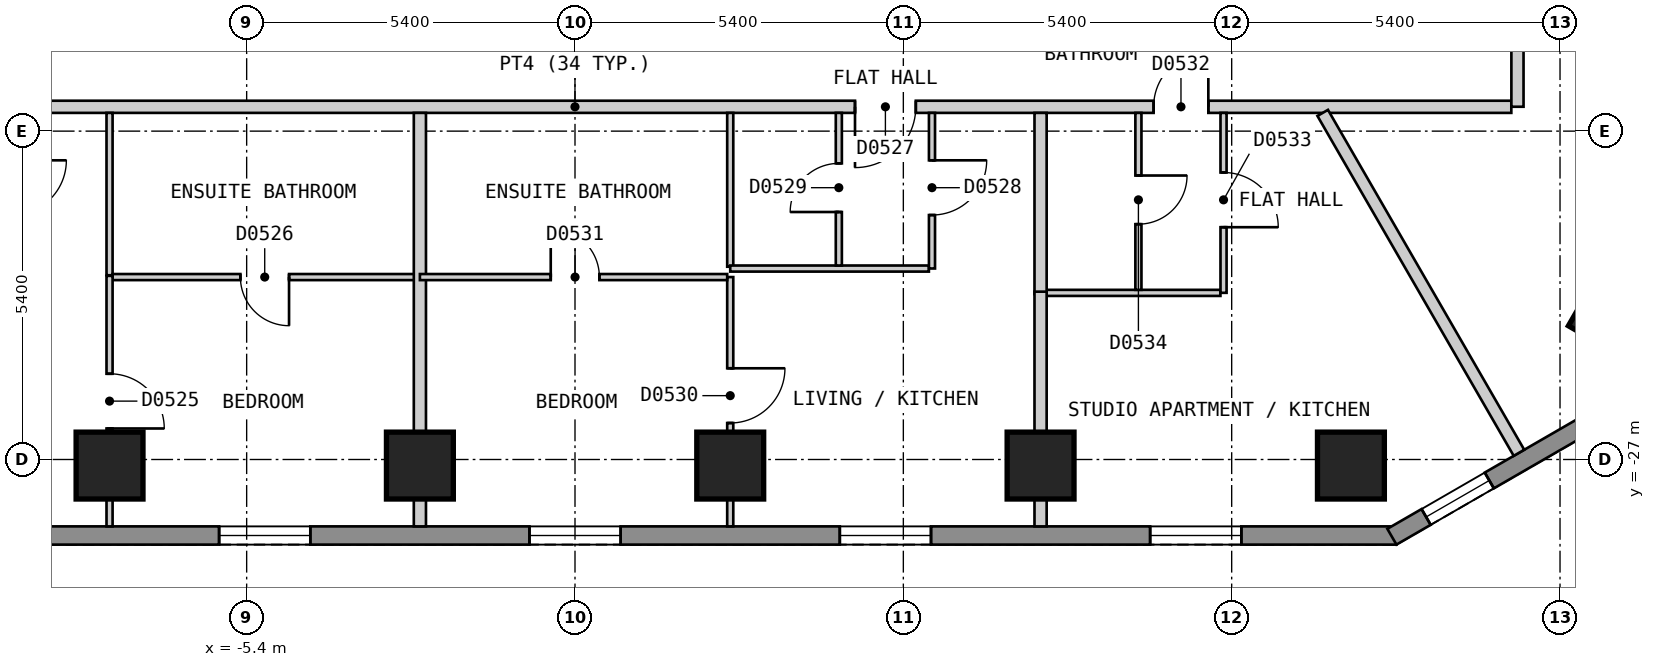
"""IFC4 building model, lengths in metres.
Left out: names, types, materials, properties, quantities, classifications, styles, units other than length and angle.
Written with IfcOpenShell. Run it as: python <this file> out.ifc"""

import sys

from ifc_helpers import new_model, si_unit, direction, frame, frame_2d, origin, origin_2d, place, context, subcontext, project, spatial, polyline, rectangle, outline, extrude, element, fill, save


model = new_model("IFC4")
c1 = context("Model", 3, precision=1e-05, world=origin(), true_north=direction((0.0, 1.0)))
c2 = subcontext(c1, "Body", "Model", "MODEL_VIEW")
j1 = project(units=[si_unit("LENGTHUNIT", "METRE"), si_unit("PLANEANGLEUNIT", "RADIAN")], contexts=[c1])
p1 = place(None, origin())
s1 = spatial("IfcSite", under=j1, at=p1, CompositionType="ELEMENT")
p2 = place(p1, origin())
s2 = spatial("IfcBuilding", under=s1, at=p2, CompositionType="ELEMENT")
p3 = place(p2, frame((0.0, 0.0, 44.4)))
s3 = spatial("IfcBuildingStorey", under=s2, at=p3, CompositionType="ELEMENT", Elevation=44.4)
for number, where, z_axis, x_axis in (
    (1, (-7.655, -27.1, 0.0), (0.0, 0.0, 1.0), (1.0, 0.0, 0.0)),
    (2, (-2.551, -27.1, 0.0), (0.0, 0.0, 1.0), (1.0, 0.0, 0.0)),
    (3, (2.553, -27.1, 0.0), (0.0, 0.0, 1.0), (1.0, 0.0, 0.0)),
    (4, (7.657, -27.1, 0.0), (0.0, 0.0, 1.0), (1.0, 0.0, 0.0)),
    (5, (12.761, -27.1, 0.0), (0.0, 0.0, 1.0), (1.0, 0.0, 0.0)),
    (6, (17.09, -24.6, 0.0), (0.0, 0.0, 1.0), (0.5, 0.866, 0.0)),
):
    element("IfcColumn", number, at=place(p3, frame(where, z_axis=z_axis, x_axis=x_axis)), inside=s3, PredefinedType="COLUMN", context=c2, shape_type="SweptSolid", body=[
        extrude(rectangle(XDim=1.1, YDim=1.1, at=origin_2d()), origin(), (0.0, 0.0, 1.0), 3.0),
    ])
p4 = place(p3, frame((-13.51, -28.25, 0.0), z_axis=(0.0, 0.0, 1.0), x_axis=(1.0, 0.0, 0.0)))
e7 = element("IfcWall", 7, at=p4, inside=s3, PredefinedType="SOLIDWALL", context=c2, shape_type="SweptSolid", body=[
    extrude(outline(polyline([(0.0, -0.15), (27.02, -0.15), (26.94, 0.15), (0.08, 0.15), (0.0, -0.15)])), origin(), (0.0, 0.0, 1.0), 2.7),
])
p5 = place(p4, frame((2.553, 0.0, 0.15)))
e8 = element("IfcOpeningElement", 8, at=p5, cuts=e7, PredefinedType="OPENING", context=c2, shape_type="SweptSolid", body=[
    extrude(rectangle(XDim=1.5, YDim=2.1, at=frame_2d((0.75, 1.05))), frame((0.0, 0.16, 0.0), z_axis=(0.0, -1.0, 0.0), x_axis=(1.0, 0.0, 0.0)), (0.0, 0.0, 1.0), 0.32),
])
p6 = place(p4, frame((7.657, 0.0, 0.15)))
e9 = element("IfcOpeningElement", 9, at=p6, cuts=e7, PredefinedType="OPENING", context=c2, shape_type="SweptSolid", body=[
    extrude(rectangle(XDim=1.5, YDim=2.1, at=frame_2d((0.75, 1.05))), frame((0.0, 0.16, 0.0), z_axis=(0.0, -1.0, 0.0), x_axis=(1.0, 0.0, 0.0)), (0.0, 0.0, 1.0), 0.32),
])
p7 = place(p4, frame((12.761, 0.0, 0.15)))
e10 = element("IfcOpeningElement", 10, at=p7, cuts=e7, PredefinedType="OPENING", context=c2, shape_type="SweptSolid", body=[
    extrude(rectangle(XDim=1.5, YDim=2.1, at=frame_2d((0.75, 1.05))), frame((0.0, 0.16, 0.0), z_axis=(0.0, -1.0, 0.0), x_axis=(1.0, 0.0, 0.0)), (0.0, 0.0, 1.0), 0.32),
])
p8 = place(p4, frame((17.865, 0.0, 0.15)))
e11 = element("IfcOpeningElement", 11, at=p8, cuts=e7, PredefinedType="OPENING", context=c2, shape_type="SweptSolid", body=[
    extrude(rectangle(XDim=1.5, YDim=2.1, at=frame_2d((0.75, 1.05))), frame((0.0, 0.16, 0.0), z_axis=(0.0, -1.0, 0.0), x_axis=(1.0, 0.0, 0.0)), (0.0, 0.0, 1.0), 0.32),
])
p9 = place(p4, frame((22.969, 0.0, 0.15)))
e12 = element("IfcOpeningElement", 12, at=p9, cuts=e7, PredefinedType="OPENING", context=c2, shape_type="SweptSolid", body=[
    extrude(rectangle(XDim=1.5, YDim=2.1, at=frame_2d((0.75, 1.05))), frame((0.0, 0.16, 0.0), z_axis=(0.0, -1.0, 0.0), x_axis=(1.0, 0.0, 0.0)), (0.0, 0.0, 1.0), 0.32),
])
p10 = place(p3, frame((13.435, -28.27, 0.0), z_axis=(0.0, 0.0, 1.0), x_axis=(0.866010750942, 0.50002537861, 0.0)))
e13 = element("IfcWall", 13, at=p10, inside=s3, PredefinedType="SOLIDWALL", context=c2, shape_type="SweptSolid", body=[
    extrude(outline(polyline([(0.0, -0.15), (5.0, -0.15), (4.919, 0.15), (0.08, 0.15), (0.0, -0.15)])), origin(), (0.0, 0.0, 1.0), 2.7),
])
p11 = place(p10, frame((0.65, 0.0, 0.15)))
e14 = element("IfcOpeningElement", 14, at=p11, cuts=e13, PredefinedType="OPENING", context=c2, shape_type="SweptSolid", body=[
    extrude(rectangle(XDim=1.2, YDim=2.1, at=frame_2d((0.6, 1.05))), frame((0.0, 0.16, 0.0), z_axis=(0.0, -1.0, 0.0), x_axis=(1.0, 0.0, 0.0)), (0.0, 0.0, 1.0), 0.32),
])
p12 = place(p3, frame((-15.4, -21.2, 0.0), z_axis=(0.0, 0.0, 1.0), x_axis=(1.0, 0.0, 0.0)))
e15 = element("IfcWall", 15, at=p12, inside=s3, PredefinedType="PARTITIONING", context=c2, shape_type="SweptSolid", body=[
    extrude(rectangle(XDim=30.799, YDim=0.2, at=frame_2d((15.399, 0.0))), origin(), (0.0, 0.0, 1.0), 2.7),
])
p13 = place(p12, frame((4.985, 0.0, 0.0)))
e16 = element("IfcOpeningElement", 16, at=p13, cuts=e15, PredefinedType="OPENING", context=c2, shape_type="SweptSolid", body=[
    extrude(rectangle(XDim=0.9, YDim=2.1, at=frame_2d((0.45, 1.05))), frame((0.0, 0.11, 0.0), z_axis=(0.0, -1.0, 0.0), x_axis=(1.0, 0.0, 0.0)), (0.0, 0.0, 1.0), 0.22),
])
p14 = place(p12, frame((20.005, 0.0, 0.0)))
e17 = element("IfcOpeningElement", 17, at=p14, cuts=e15, PredefinedType="OPENING", context=c2, shape_type="SweptSolid", body=[
    extrude(rectangle(XDim=1.0, YDim=2.1, at=frame_2d((0.5, 1.05))), frame((0.0, 0.11, 0.0), z_axis=(0.0, -1.0, 0.0), x_axis=(1.0, 0.0, 0.0)), (0.0, 0.0, 1.0), 0.22),
])
p15 = place(p12, frame((24.916, 0.0, 0.0)))
e18 = element("IfcOpeningElement", 18, at=p15, cuts=e15, PredefinedType="OPENING", context=c2, shape_type="SweptSolid", body=[
    extrude(rectangle(XDim=0.9, YDim=2.1, at=frame_2d((0.45, 1.05))), frame((0.0, 0.11, 0.0), z_axis=(0.0, -1.0, 0.0), x_axis=(1.0, 0.0, 0.0)), (0.0, 0.0, 1.0), 0.22),
])
p16 = place(p3, frame((15.5, -21.199, 0.0), z_axis=(0.0, 0.0, 1.0), x_axis=(0.0, 1.0, 0.0)))
e19 = element("IfcWall", 19, at=p16, inside=s3, PredefinedType="PARTITIONING", context=c2, shape_type="SweptSolid", body=[
    extrude(rectangle(XDim=7.575, YDim=0.2, at=frame_2d((3.788, 0.0))), origin(), (0.0, 0.0, 1.0), 2.7),
])
p17 = place(p16, frame((1.288, 0.0, 0.0)))
e20 = element("IfcOpeningElement", 20, at=p17, cuts=e19, PredefinedType="OPENING", context=c2, shape_type="SweptSolid", body=[
    extrude(rectangle(XDim=0.8, YDim=2.1, at=frame_2d((0.4, 1.05))), frame((0.0, 0.11, 0.0), z_axis=(0.0, -1.0, 0.0), x_axis=(1.0, 0.0, 0.0)), (0.0, 0.0, 1.0), 0.22),
])
p18 = place(p3, frame((-7.655, -21.3, 0.0), z_axis=(0.0, 0.0, 1.0), x_axis=(0.0, -1.0, 0.0)))
e21 = element("IfcWall", 21, at=p18, inside=s3, PredefinedType="PARTITIONING", context=c2, shape_type="SweptSolid", body=[
    extrude(rectangle(XDim=2.67, YDim=0.1, at=frame_2d((1.335, 0.0))), origin(), (0.0, 0.0, 1.0), 2.7),
])
p19 = place(p3, frame((2.553, -21.3, 0.0), z_axis=(0.0, 0.0, 1.0), x_axis=(0.0, -1.0, 0.0)))
e22 = element("IfcWall", 22, at=p19, inside=s3, PredefinedType="PARTITIONING", context=c2, shape_type="SweptSolid", body=[
    extrude(rectangle(XDim=2.53, YDim=0.1, at=frame_2d((1.265, 0.0))), origin(), (0.0, 0.0, 1.0), 2.7),
])
p20 = place(p3, frame((2.553, -23.86, 0.0), z_axis=(0.0, 0.0, 1.0), x_axis=(1.0, 0.0, 0.0)))
e23 = element("IfcWall", 23, at=p20, inside=s3, PredefinedType="PARTITIONING", context=c2, shape_type="SweptSolid", body=[
    extrude(rectangle(XDim=3.267, YDim=0.1, at=frame_2d((1.634, 0.0))), origin(), (0.0, 0.0, 1.0), 2.7),
])
p21 = place(p3, frame((-7.605, -24.0, 0.0), z_axis=(0.0, 0.0, 1.0), x_axis=(1.0, 0.0, 0.0)))
e24 = element("IfcWall", 24, at=p21, inside=s3, PredefinedType="PARTITIONING", context=c2, shape_type="SweptSolid", body=[
    extrude(rectangle(XDim=5.054, YDim=0.1, at=frame_2d((2.527, 0.0))), origin(), (0.0, 0.0, 1.0), 2.7),
])
p22 = place(p21, frame((2.102, 0.0, 0.0)))
e25 = element("IfcOpeningElement", 25, at=p22, cuts=e24, PredefinedType="OPENING", context=c2, shape_type="SweptSolid", body=[
    extrude(rectangle(XDim=0.8, YDim=2.1, at=frame_2d((0.4, 1.05))), frame((0.0, 0.06, 0.0), z_axis=(0.0, -1.0, 0.0), x_axis=(1.0, 0.0, 0.0)), (0.0, 0.0, 1.0), 0.12),
])
p23 = place(p3, frame((7.757, -24.26, 0.0), z_axis=(0.0, 0.0, 1.0), x_axis=(1.0, 0.0, 0.0)))
e26 = element("IfcWall", 26, at=p23, inside=s3, PredefinedType="PARTITIONING", context=c2, shape_type="SweptSolid", body=[
    extrude(rectangle(XDim=2.858, YDim=0.1, at=frame_2d((1.429, 0.0))), origin(), (0.0, 0.0, 1.0), 2.7),
])
p24 = place(p3, frame((4.339, -23.81, 0.0), z_axis=(0.0, 0.0, 1.0), x_axis=(0.0, 1.0, 0.0)))
e27 = element("IfcWall", 27, at=p24, inside=s3, PredefinedType="PARTITIONING", context=c2, shape_type="SweptSolid", body=[
    extrude(rectangle(XDim=2.51, YDim=0.1, at=frame_2d((1.255, 0.0))), origin(), (0.0, 0.0, 1.0), 2.7),
])
p25 = place(p24, frame((0.88, 0.0, 0.0)))
e28 = element("IfcOpeningElement", 28, at=p25, cuts=e27, PredefinedType="OPENING", context=c2, shape_type="SweptSolid", body=[
    extrude(rectangle(XDim=0.8, YDim=2.1, at=frame_2d((0.4, 1.05))), frame((0.0, 0.06, 0.0), z_axis=(0.0, -1.0, 0.0), x_axis=(1.0, 0.0, 0.0)), (0.0, 0.0, 1.0), 0.12),
])
p26 = place(p3, frame((5.871, -23.859, 0.0), z_axis=(0.0, 0.0, 1.0), x_axis=(0.0, 1.0, 0.0)))
e29 = element("IfcWall", 29, at=p26, inside=s3, PredefinedType="PARTITIONING", context=c2, shape_type="SweptSolid", body=[
    extrude(rectangle(XDim=2.559, YDim=0.1, at=frame_2d((1.279, 0.0))), origin(), (0.0, 0.0, 1.0), 2.7),
])
p27 = place(p26, frame((0.879, 0.0, 0.0)))
e30 = element("IfcOpeningElement", 30, at=p27, cuts=e29, PredefinedType="OPENING", context=c2, shape_type="SweptSolid", body=[
    extrude(rectangle(XDim=0.9, YDim=2.1, at=frame_2d((0.45, 1.05))), frame((0.0, 0.06, 0.0), z_axis=(0.0, -1.0, 0.0), x_axis=(1.0, 0.0, 0.0)), (0.0, 0.0, 1.0), 0.12),
])
p28 = place(p3, frame((9.266, -24.21, 0.0), z_axis=(0.0, 0.0, 1.0), x_axis=(0.0, 1.0, 0.0)))
e31 = element("IfcWall", 31, at=p28, inside=s3, PredefinedType="PARTITIONING", context=c2, shape_type="SweptSolid", body=[
    extrude(rectangle(XDim=2.91, YDim=0.1, at=frame_2d((1.455, 0.0))), origin(), (0.0, 0.0, 1.0), 2.7),
])
p29 = place(p28, frame((1.08, 0.0, 0.0)))
e32 = element("IfcOpeningElement", 32, at=p29, cuts=e31, PredefinedType="OPENING", context=c2, shape_type="SweptSolid", body=[
    extrude(rectangle(XDim=0.8, YDim=2.1, at=frame_2d((0.4, 1.05))), frame((0.0, 0.06, 0.0), z_axis=(0.0, -1.0, 0.0), x_axis=(1.0, 0.0, 0.0)), (0.0, 0.0, 1.0), 0.12),
])
p30 = place(p3, frame((10.666, -24.259, 0.0), z_axis=(0.0, 0.0, 1.0), x_axis=(0.0, 1.0, 0.0)))
e33 = element("IfcWall", 33, at=p30, inside=s3, PredefinedType="PARTITIONING", context=c2, shape_type="SweptSolid", body=[
    extrude(rectangle(XDim=2.959, YDim=0.1, at=frame_2d((1.479, 0.0))), origin(), (0.0, 0.0, 1.0), 2.7),
])
p31 = place(p30, frame((1.079, 0.0, 0.0)))
e34 = element("IfcOpeningElement", 34, at=p31, cuts=e33, PredefinedType="OPENING", context=c2, shape_type="SweptSolid", body=[
    extrude(rectangle(XDim=0.9, YDim=2.1, at=frame_2d((0.45, 1.05))), frame((0.0, 0.06, 0.0), z_axis=(0.0, -1.0, 0.0), x_axis=(1.0, 0.0, 0.0)), (0.0, 0.0, 1.0), 0.12),
])
p32 = place(p3, frame((2.553, -28.1, 0.0), z_axis=(0.0, 0.0, 1.0), x_axis=(0.0, 1.0, 0.0)))
e35 = element("IfcWall", 35, at=p32, inside=s3, PredefinedType="PARTITIONING", context=c2, shape_type="SweptSolid", body=[
    extrude(rectangle(XDim=4.1, YDim=0.1, at=frame_2d((2.05, 0.0))), origin(), (0.0, 0.0, 1.0), 2.7),
])
p33 = place(p32, frame((1.7, 0.0, 0.0)))
e36 = element("IfcOpeningElement", 36, at=p33, cuts=e35, PredefinedType="OPENING", context=c2, shape_type="SweptSolid", body=[
    extrude(rectangle(XDim=0.9, YDim=2.1, at=frame_2d((0.45, 1.05))), frame((0.0, 0.06, 0.0), z_axis=(0.0, -1.0, 0.0), x_axis=(1.0, 0.0, 0.0)), (0.0, 0.0, 1.0), 0.12),
])
p34 = place(p3, frame((-7.655, -28.1, 0.0), z_axis=(0.0, 0.0, 1.0), x_axis=(0.0, 1.0, 0.0)))
e37 = element("IfcWall", 37, at=p34, inside=s3, PredefinedType="PARTITIONING", context=c2, shape_type="SweptSolid", body=[
    extrude(rectangle(XDim=4.12, YDim=0.1, at=frame_2d((2.06, 0.0))), origin(), (0.0, 0.0, 1.0), 2.7),
])
p35 = place(p34, frame((1.61, 0.0, 0.0)))
e38 = element("IfcOpeningElement", 38, at=p35, cuts=e37, PredefinedType="OPENING", context=c2, shape_type="SweptSolid", body=[
    extrude(rectangle(XDim=0.9, YDim=2.1, at=frame_2d((0.45, 1.05))), frame((0.0, 0.06, 0.0), z_axis=(0.0, -1.0, 0.0), x_axis=(1.0, 0.0, 0.0)), (0.0, 0.0, 1.0), 0.12),
])
p36 = place(p3, frame((12.297, -21.3, 0.0), z_axis=(0.0, 0.0, 1.0), x_axis=(0.500056399578, -0.865992839024, 0.0)))
e39 = element("IfcWall", 39, at=p36, inside=s3, PredefinedType="PARTITIONING", context=c2, shape_type="SweptSolid", body=[
    extrude(rectangle(XDim=6.455, YDim=0.2, at=frame_2d((3.228, 0.0))), origin(), (0.0, 0.0, 1.0), 2.7),
])
p37 = place(p3, frame((7.657, -21.3, 0.0), z_axis=(0.0, 0.0, 1.0), x_axis=(0.0, -1.0, 0.0)))
e40 = element("IfcWall", 40, at=p37, inside=s3, PredefinedType="PARTITIONING", context=c2, shape_type="SweptSolid", body=[
    extrude(rectangle(XDim=2.98, YDim=0.2, at=frame_2d((1.49, 0.0))), origin(), (0.0, 0.0, 1.0), 2.7),
])
p38 = place(p3, frame((15.6, -17.846, 0.0), z_axis=(0.0, 0.0, 1.0), x_axis=(0.866071523686, -0.499920109479, 0.0)))
e41 = element("IfcWall", 41, at=p38, inside=s3, PredefinedType="PARTITIONING", context=c2, shape_type="SweptSolid", body=[
    extrude(rectangle(XDim=5.667, YDim=0.2, at=frame_2d((2.833, 0.0))), origin(), (0.0, 0.0, 1.0), 2.7),
])
p39 = place(p3, frame((7.657, -28.1, 0.0), z_axis=(0.0, 0.0, 1.0), x_axis=(0.0, 1.0, 0.0)))
e42 = element("IfcWall", 42, at=p39, inside=s3, PredefinedType="PARTITIONING", context=c2, shape_type="SweptSolid", body=[
    extrude(rectangle(XDim=3.86, YDim=0.2, at=frame_2d((1.93, 0.0))), origin(), (0.0, 0.0, 1.0), 2.7),
])
p40 = place(p3, frame((-2.551, -28.1, 0.0), z_axis=(0.0, 0.0, 1.0), x_axis=(0.0, 1.0, 0.0)))
e43 = element("IfcWall", 43, at=p40, inside=s3, PredefinedType="PARTITIONING", context=c2, shape_type="SweptSolid", body=[
    extrude(rectangle(XDim=6.8, YDim=0.2, at=frame_2d((3.4, 0.0))), origin(), (0.0, 0.0, 1.0), 2.7),
])
p41 = place(p3, frame((-2.551, -24.0, 0.0), z_axis=(0.0, 0.0, 1.0), x_axis=(1.0, 0.0, 0.0)))
e44 = element("IfcWall", 44, at=p41, inside=s3, PredefinedType="PARTITIONING", context=c2, shape_type="SweptSolid", body=[
    extrude(rectangle(XDim=5.054, YDim=0.1, at=frame_2d((2.527, 0.0))), origin(), (0.0, 0.0, 1.0), 2.7),
])
p42 = place(p41, frame((2.152, 0.0, 0.0)))
e45 = element("IfcOpeningElement", 45, at=p42, cuts=e44, PredefinedType="OPENING", context=c2, shape_type="SweptSolid", body=[
    extrude(rectangle(XDim=0.8, YDim=2.1, at=frame_2d((0.4, 1.05))), frame((0.0, 0.06, 0.0), z_axis=(0.0, -1.0, 0.0), x_axis=(1.0, 0.0, 0.0)), (0.0, 0.0, 1.0), 0.12),
])
p43 = place(p6, origin())
e46 = element("IfcWindow", 46, at=p43, inside=s3, PartitioningType="SINGLE_PANEL", PredefinedType="WINDOW", context=c2, shape_type="SweptSolid", body=[
    extrude(rectangle(XDim=1.5, YDim=2.1, at=frame_2d((0.75, 1.05))), frame((0.0, 0.03, 0.0), z_axis=(0.0, -1.0, 0.0), x_axis=(1.0, 0.0, 0.0)), (0.0, 0.0, 1.0), 0.06),
])
fill(e9, e46)
p44 = place(p7, origin())
e47 = element("IfcWindow", 47, at=p44, inside=s3, PartitioningType="SINGLE_PANEL", PredefinedType="WINDOW", context=c2, shape_type="SweptSolid", body=[
    extrude(rectangle(XDim=1.5, YDim=2.1, at=frame_2d((0.75, 1.05))), frame((0.0, 0.03, 0.0), z_axis=(0.0, -1.0, 0.0), x_axis=(1.0, 0.0, 0.0)), (0.0, 0.0, 1.0), 0.06),
])
fill(e10, e47)
p45 = place(p8, origin())
e48 = element("IfcWindow", 48, at=p45, inside=s3, PartitioningType="SINGLE_PANEL", PredefinedType="WINDOW", context=c2, shape_type="SweptSolid", body=[
    extrude(rectangle(XDim=1.5, YDim=2.1, at=frame_2d((0.75, 1.05))), frame((0.0, 0.03, 0.0), z_axis=(0.0, -1.0, 0.0), x_axis=(1.0, 0.0, 0.0)), (0.0, 0.0, 1.0), 0.06),
])
fill(e11, e48)
p46 = place(p9, origin())
e49 = element("IfcWindow", 49, at=p46, inside=s3, PartitioningType="SINGLE_PANEL", PredefinedType="WINDOW", context=c2, shape_type="SweptSolid", body=[
    extrude(rectangle(XDim=1.5, YDim=2.1, at=frame_2d((0.75, 1.05))), frame((0.0, 0.03, 0.0), z_axis=(0.0, -1.0, 0.0), x_axis=(1.0, 0.0, 0.0)), (0.0, 0.0, 1.0), 0.06),
])
fill(e12, e49)
p47 = place(p11, origin())
e50 = element("IfcWindow", 50, at=p47, inside=s3, PartitioningType="SINGLE_PANEL", PredefinedType="WINDOW", context=c2, shape_type="SweptSolid", body=[
    extrude(rectangle(XDim=1.2, YDim=2.1, at=frame_2d((0.6, 1.05))), frame((0.0, 0.03, 0.0), z_axis=(0.0, -1.0, 0.0), x_axis=(1.0, 0.0, 0.0)), (0.0, 0.0, 1.0), 0.06),
])
fill(e14, e50)
p48 = place(p35, origin())
e51 = element("IfcDoor", 51, at=p48, inside=s3, OperationType="SINGLE_SWING_LEFT", PredefinedType="DOOR", context=c2, shape_type="SweptSolid", body=[
    extrude(rectangle(XDim=0.9, YDim=2.1, at=frame_2d((0.45, 1.05))), frame((0.0, 0.025, 0.0), z_axis=(0.0, -1.0, 0.0), x_axis=(1.0, 0.0, 0.0)), (0.0, 0.0, 1.0), 0.05),
])
fill(e38, e51)
p49 = place(p22, origin())
e52 = element("IfcDoor", 52, at=p49, inside=s3, OperationType="SINGLE_SWING_RIGHT", PredefinedType="DOOR", context=c2, shape_type="SweptSolid", body=[
    extrude(rectangle(XDim=0.8, YDim=2.1, at=frame_2d((0.4, 1.05))), frame((0.0, 0.025, 0.0), z_axis=(0.0, -1.0, 0.0), x_axis=(1.0, 0.0, 0.0)), (0.0, 0.0, 1.0), 0.05),
])
fill(e25, e52)
p50 = place(p14, origin())
e53 = element("IfcDoor", 53, at=p50, inside=s3, OperationType="SINGLE_SWING_LEFT", PredefinedType="DOOR", context=c2, shape_type="SweptSolid", body=[
    extrude(rectangle(XDim=1.0, YDim=2.1, at=frame_2d((0.5, 1.05))), frame((0.0, 0.025, 0.0), z_axis=(0.0, -1.0, 0.0), x_axis=(1.0, 0.0, 0.0)), (0.0, 0.0, 1.0), 0.05),
])
fill(e17, e53)
p51 = place(p27, origin())
e54 = element("IfcDoor", 54, at=p51, inside=s3, OperationType="SINGLE_SWING_RIGHT", PredefinedType="DOOR", context=c2, shape_type="SweptSolid", body=[
    extrude(rectangle(XDim=0.9, YDim=2.1, at=frame_2d((0.45, 1.05))), frame((0.0, 0.025, 0.0), z_axis=(0.0, -1.0, 0.0), x_axis=(1.0, 0.0, 0.0)), (0.0, 0.0, 1.0), 0.05),
])
fill(e30, e54)
p52 = place(p25, origin())
e55 = element("IfcDoor", 55, at=p52, inside=s3, OperationType="SINGLE_SWING_LEFT", PredefinedType="DOOR", context=c2, shape_type="SweptSolid", body=[
    extrude(rectangle(XDim=0.8, YDim=2.1, at=frame_2d((0.4, 1.05))), frame((0.0, 0.025, 0.0), z_axis=(0.0, -1.0, 0.0), x_axis=(1.0, 0.0, 0.0)), (0.0, 0.0, 1.0), 0.05),
])
fill(e28, e55)
p53 = place(p33, origin())
e56 = element("IfcDoor", 56, at=p53, inside=s3, OperationType="SINGLE_SWING_RIGHT", PredefinedType="DOOR", context=c2, shape_type="SweptSolid", body=[
    extrude(rectangle(XDim=0.9, YDim=2.1, at=frame_2d((0.45, 1.05))), frame((0.0, 0.025, 0.0), z_axis=(0.0, -1.0, 0.0), x_axis=(1.0, 0.0, 0.0)), (0.0, 0.0, 1.0), 0.05),
])
fill(e36, e56)
p54 = place(p42, origin())
e57 = element("IfcDoor", 57, at=p54, inside=s3, OperationType="SINGLE_SWING_LEFT", PredefinedType="DOOR", context=c2, shape_type="SweptSolid", body=[
    extrude(rectangle(XDim=0.8, YDim=2.1, at=frame_2d((0.4, 1.05))), frame((0.0, 0.025, 0.0), z_axis=(0.0, -1.0, 0.0), x_axis=(1.0, 0.0, 0.0)), (0.0, 0.0, 1.0), 0.05),
])
fill(e45, e57)
p55 = place(p15, origin())
e58 = element("IfcDoor", 58, at=p55, inside=s3, OperationType="SINGLE_SWING_RIGHT", PredefinedType="DOOR", context=c2, shape_type="SweptSolid", body=[
    extrude(rectangle(XDim=0.9, YDim=2.1, at=frame_2d((0.45, 1.05))), frame((0.0, 0.025, 0.0), z_axis=(0.0, -1.0, 0.0), x_axis=(1.0, 0.0, 0.0)), (0.0, 0.0, 1.0), 0.05),
])
fill(e18, e58)
p56 = place(p31, origin())
e59 = element("IfcDoor", 59, at=p56, inside=s3, OperationType="SINGLE_SWING_LEFT", PredefinedType="DOOR", context=c2, shape_type="SweptSolid", body=[
    extrude(rectangle(XDim=0.9, YDim=2.1, at=frame_2d((0.45, 1.05))), frame((0.0, 0.025, 0.0), z_axis=(0.0, -1.0, 0.0), x_axis=(1.0, 0.0, 0.0)), (0.0, 0.0, 1.0), 0.05),
])
fill(e34, e59)
p57 = place(p29, origin())
e60 = element("IfcDoor", 60, at=p57, inside=s3, OperationType="SINGLE_SWING_RIGHT", PredefinedType="DOOR", context=c2, shape_type="SweptSolid", body=[
    extrude(rectangle(XDim=0.8, YDim=2.1, at=frame_2d((0.4, 1.05))), frame((0.0, 0.025, 0.0), z_axis=(0.0, -1.0, 0.0), x_axis=(1.0, 0.0, 0.0)), (0.0, 0.0, 1.0), 0.05),
])
fill(e32, e60)
save(model, sys.argv[1])
